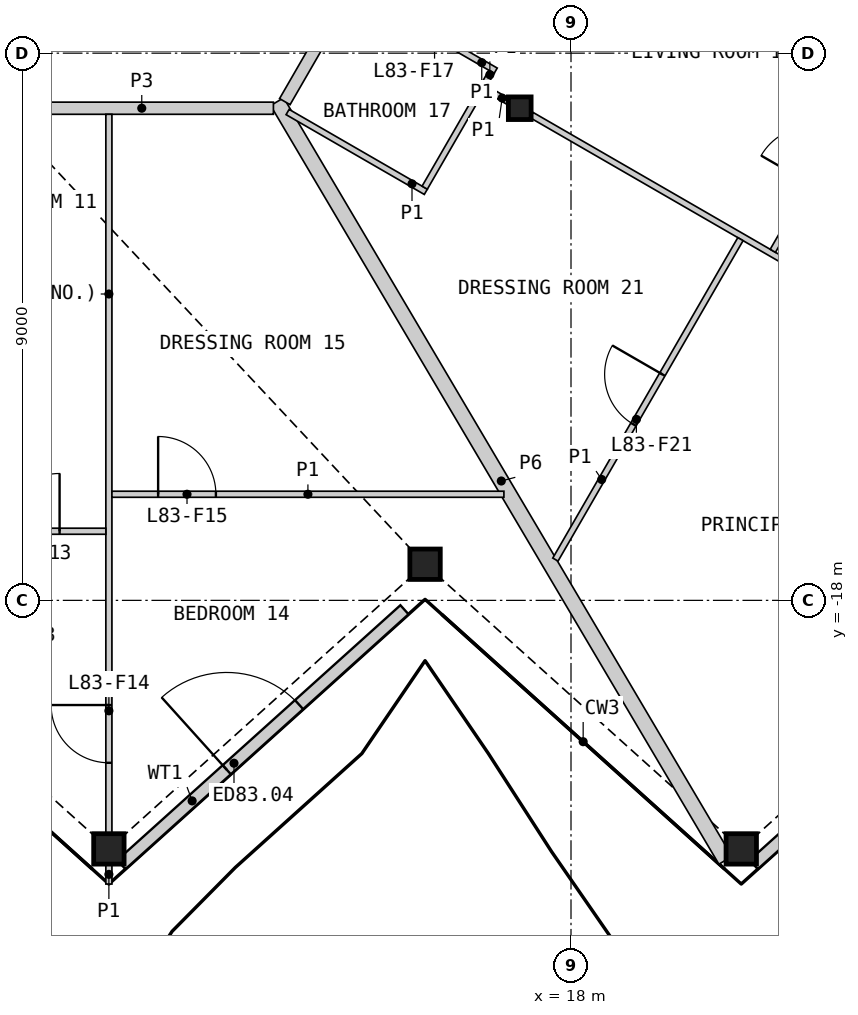
"""IFC4 building model, lengths in metres.
Left out: names, types, materials, properties, quantities, classifications, styles, units other than length and angle.
Written with IfcOpenShell. Run it as: python <this file> out.ifc"""

import sys

from ifc_helpers import new_model, si_unit, direction, frame, frame_2d, origin, origin_2d, place, context, subcontext, project, spatial, rectangle, hollow_rectangle, i_section, extrude, element, fill, save


model = new_model("IFC4")
c1 = context("Model", 3, precision=1e-05, world=origin(), true_north=direction((0.0, 1.0)))
c2 = subcontext(c1, "Body", "Model", "MODEL_VIEW")
j1 = project(units=[si_unit("LENGTHUNIT", "METRE"), si_unit("PLANEANGLEUNIT", "RADIAN")], contexts=[c1])
p1 = place(None, origin())
s1 = spatial("IfcSite", under=j1, at=p1, CompositionType="ELEMENT")
p2 = place(p1, origin())
s2 = spatial("IfcBuilding", under=s1, at=p2, CompositionType="ELEMENT")
p3 = place(p2, frame((0.0, 0.0, 371.2)))
s3 = spatial("IfcBuildingStorey", under=s2, at=p3, CompositionType="ELEMENT", Elevation=371.2)
for number, where, z_axis, x_axis in (
    (1, (10.4, -22.088, 0.0), (0.0, 0.0, 1.0), (1.0, 0.0, 0.0)),
    (2, (15.6, -17.406, 0.0), (0.0, 0.0, 1.0), (1.0, 0.0, 0.0)),
    (3, (20.8, -22.088, 0.0), (0.0, 0.0, 1.0), (1.0, 0.0, 0.0)),
):
    element("IfcColumn", number, at=place(p3, frame(where, z_axis=z_axis, x_axis=x_axis)), inside=s3, PredefinedType="COLUMN", context=c2, shape_type="SweptSolid", body=[
        extrude(hollow_rectangle(XDim=0.5, YDim=0.5, WallThickness=0.03, at=origin_2d()), origin(), (0.0, 0.0, 1.0), 3.4),
    ])
p4 = place(p3, frame((17.157, -9.906, 0.0), z_axis=(0.0, 0.0, 1.0), x_axis=(1.0, 0.0, 0.0)))
e4 = element("IfcColumn", 4, at=p4, inside=s3, PredefinedType="COLUMN", context=c2, shape_type="SweptSolid", body=[
    extrude(i_section(OverallWidth=0.374, OverallDepth=0.372, WebThickness=0.016, FlangeThickness=0.026, at=origin_2d()), origin(), (0.0, 0.0, 1.0), 3.4),
])
p5 = place(p3, frame((10.605, -22.346, 0.0), z_axis=(0.0, 0.0, 1.0), x_axis=(0.743137181878, 0.669139095339, 0.0)))
e5 = element("IfcWall", 5, at=p5, inside=s3, PredefinedType="SOLIDWALL", context=c2, shape_type="SweptSolid", body=[
    extrude(rectangle(XDim=6.265, YDim=0.2, at=frame_2d((3.133, 0.0))), origin(), (0.0, 0.0, 1.0), 2.634),
])
p6 = place(p5, frame((2.333, 0.0, 0.0)))
e6 = element("IfcOpeningElement", 6, at=p6, cuts=e5, PredefinedType="OPENING", context=c2, shape_type="SweptSolid", body=[
    extrude(rectangle(XDim=1.6, YDim=2.25, at=frame_2d((0.8, 1.125))), frame((0.0, 0.11, 0.0), z_axis=(0.0, -1.0, 0.0), x_axis=(1.0, 0.0, 0.0)), (0.0, 0.0, 1.0), 0.22),
])
p7 = place(p3, frame((21.005, -22.346, 0.0), z_axis=(0.0, 0.0, 1.0), x_axis=(0.743137181878, 0.669139095339, 0.0)))
e7 = element("IfcWall", 7, at=p7, inside=s3, PredefinedType="SOLIDWALL", context=c2, shape_type="SweptSolid", body=[
    extrude(rectangle(XDim=6.265, YDim=0.2, at=frame_2d((3.133, 0.0))), origin(), (0.0, 0.0, 1.0), 2.634),
])
p8 = place(p7, frame((2.333, 0.0, 0.0)))
e8 = element("IfcOpeningElement", 8, at=p8, cuts=e7, PredefinedType="OPENING", context=c2, shape_type="SweptSolid", body=[
    extrude(rectangle(XDim=1.6, YDim=2.25, at=frame_2d((0.8, 1.125))), frame((0.0, 0.11, 0.0), z_axis=(0.0, -1.0, 0.0), x_axis=(1.0, 0.0, 0.0)), (0.0, 0.0, 1.0), 0.22),
])
p9 = place(p3, frame((13.167, -9.798, 0.0), z_axis=(0.0, 0.0, 1.0), x_axis=(0.508707178493, -0.860939606796, 0.0)))
e9 = element("IfcWall", 9, at=p9, inside=s3, PredefinedType="PARTITIONING", context=c2, shape_type="SweptSolid", body=[
    extrude(rectangle(XDim=14.493, YDim=0.25, at=frame_2d((7.247, 0.0))), origin(), (0.0, 0.0, 1.0), 2.33),
])
p10 = place(p3, frame((8.775, -9.906, 0.0), z_axis=(0.0, 0.0, 1.0), x_axis=(1.0, 0.0, 0.0)))
e10 = element("IfcWall", 10, at=p10, inside=s3, PredefinedType="PARTITIONING", context=c2, shape_type="SweptSolid", body=[
    extrude(rectangle(XDim=4.331, YDim=0.2, at=frame_2d((2.165, 0.0))), origin(), (0.0, 0.0, 1.0), 3.1),
])
p11 = place(p3, frame((13.293, -9.797, 0.0), z_axis=(0.0, 0.0, 1.0), x_axis=(0.499967746641, 0.866044024469, 0.0)))
e11 = element("IfcWall", 11, at=p11, inside=s3, PredefinedType="PARTITIONING", context=c2, shape_type="SweptSolid", body=[
    extrude(rectangle(XDim=3.676, YDim=0.2, at=frame_2d((1.838, 0.0))), origin(), (0.0, 0.0, 1.0), 3.1),
])
p12 = place(p11, frame((2.426, 0.0, 0.0)))
e12 = element("IfcOpeningElement", 12, at=p12, cuts=e11, PredefinedType="OPENING", context=c2, shape_type="SweptSolid", body=[
    extrude(rectangle(XDim=1.0, YDim=2.1, at=frame_2d((0.5, 1.05))), frame((0.0, 0.11, 0.0), z_axis=(0.0, -1.0, 0.0), x_axis=(1.0, 0.0, 0.0)), (0.0, 0.0, 1.0), 0.22),
])
p13 = place(p3, frame((10.4, -21.828, 0.0), z_axis=(0.0, 0.0, 1.0), x_axis=(0.0, 1.0, 0.0)))
e13 = element("IfcWall", 13, at=p13, inside=s3, PredefinedType="PARTITIONING", context=c2, shape_type="SweptSolid", body=[
    extrude(rectangle(XDim=11.822, YDim=0.1, at=frame_2d((5.911, 0.0))), origin(), (0.0, 0.0, 1.0), 2.33),
])
p14 = place(p13, frame((1.156, 0.0, 0.0)))
e14 = element("IfcOpeningElement", 14, at=p14, cuts=e13, PredefinedType="OPENING", context=c2, shape_type="SweptSolid", body=[
    extrude(rectangle(XDim=0.95, YDim=2.1, at=frame_2d((0.475, 1.05))), frame((0.0, 0.06, 0.0), z_axis=(0.0, -1.0, 0.0), x_axis=(1.0, 0.0, 0.0)), (0.0, 0.0, 1.0), 0.12),
])
p15 = place(p3, frame((17.354, -10.019, 0.0), z_axis=(0.0, 0.0, 1.0), x_axis=(0.866019680922, -0.500009912158, 0.0)))
e15 = element("IfcWall", 15, at=p15, inside=s3, PredefinedType="PARTITIONING", context=c2, shape_type="SweptSolid", body=[
    extrude(rectangle(XDim=10.881, YDim=0.1, at=frame_2d((5.44, 0.0))), origin(), (0.0, 0.0, 1.0), 2.33),
])
p16 = place(p15, frame((8.276, 0.0, 0.0)))
e16 = element("IfcOpeningElement", 16, at=p16, cuts=e15, PredefinedType="OPENING", context=c2, shape_type="SweptSolid", body=[
    extrude(rectangle(XDim=0.95, YDim=2.1, at=frame_2d((0.475, 1.05))), frame((0.0, 0.06, 0.0), z_axis=(0.0, -1.0, 0.0), x_axis=(1.0, 0.0, 0.0)), (0.0, 0.0, 1.0), 0.12),
])
p17 = place(p3, frame((21.319, -12.251, 0.0), z_axis=(0.0, 0.0, 1.0), x_axis=(0.499999833739, 0.866025499775, 0.0)))
e17 = element("IfcWall", 17, at=p17, inside=s3, PredefinedType="PARTITIONING", context=c2, shape_type="SweptSolid", body=[
    extrude(rectangle(XDim=6.4, YDim=0.1, at=frame_2d((3.2, 0.0))), origin(), (0.0, 0.0, 1.0), 2.33),
])
p18 = place(p17, frame((1.26, 0.0, 0.0)))
e18 = element("IfcOpeningElement", 18, at=p18, cuts=e17, PredefinedType="OPENING", context=c2, shape_type="SweptSolid", body=[
    extrude(rectangle(XDim=0.95, YDim=2.1, at=frame_2d((0.475, 1.05))), frame((0.0, 0.06, 0.0), z_axis=(0.0, -1.0, 0.0), x_axis=(1.0, 0.0, 0.0)), (0.0, 0.0, 1.0), 0.12),
])
p19 = place(p3, frame((10.45, -16.255, 0.0), z_axis=(0.0, 0.0, 1.0), x_axis=(1.0, 0.0, 0.0)))
e19 = element("IfcWall", 19, at=p19, inside=s3, PredefinedType="PARTITIONING", context=c2, shape_type="SweptSolid", body=[
    extrude(rectangle(XDim=6.447, YDim=0.1, at=frame_2d((3.223, 0.0))), origin(), (0.0, 0.0, 1.0), 2.33),
])
p20 = place(p19, frame((0.76, 0.0, 0.0)))
e20 = element("IfcOpeningElement", 20, at=p20, cuts=e19, PredefinedType="OPENING", context=c2, shape_type="SweptSolid", body=[
    extrude(rectangle(XDim=0.95, YDim=2.1, at=frame_2d((0.475, 1.05))), frame((0.0, 0.06, 0.0), z_axis=(0.0, -1.0, 0.0), x_axis=(1.0, 0.0, 0.0)), (0.0, 0.0, 1.0), 0.12),
])
p21 = place(p3, frame((17.744, -17.329, 0.0), z_axis=(0.0, 0.0, 1.0), x_axis=(0.49997479812, 0.866039953608, 0.0)))
e21 = element("IfcWall", 21, at=p21, inside=s3, PredefinedType="PARTITIONING", context=c2, shape_type="SweptSolid", body=[
    extrude(rectangle(XDim=6.086, YDim=0.1, at=frame_2d((3.043, 0.0))), origin(), (0.0, 0.0, 1.0), 2.33),
])
p22 = place(p21, frame((2.568, 0.0, 0.0)))
e22 = element("IfcOpeningElement", 22, at=p22, cuts=e21, PredefinedType="OPENING", context=c2, shape_type="SweptSolid", body=[
    extrude(rectangle(XDim=0.95, YDim=2.1, at=frame_2d((0.475, 1.05))), frame((0.0, 0.06, 0.0), z_axis=(0.0, -1.0, 0.0), x_axis=(1.0, 0.0, 0.0)), (0.0, 0.0, 1.0), 0.12),
])
p23 = place(p3, frame((5.325, -16.863, 0.0), z_axis=(0.0, 0.0, 1.0), x_axis=(1.0, 0.0, 0.0)))
e23 = element("IfcWall", 23, at=p23, inside=s3, PredefinedType="PARTITIONING", context=c2, shape_type="SweptSolid", body=[
    extrude(rectangle(XDim=5.025, YDim=0.1, at=frame_2d((2.513, 0.0))), origin(), (0.0, 0.0, 1.0), 2.33),
])
p24 = place(p23, frame((3.314, 0.0, 0.0)))
e24 = element("IfcOpeningElement", 24, at=p24, cuts=e23, PredefinedType="OPENING", context=c2, shape_type="SweptSolid", body=[
    extrude(rectangle(XDim=0.95, YDim=2.1, at=frame_2d((0.475, 1.05))), frame((0.0, 0.06, 0.0), z_axis=(0.0, -1.0, 0.0), x_axis=(1.0, 0.0, 0.0)), (0.0, 0.0, 1.0), 0.12),
])
p25 = place(p3, frame((13.339, -9.968, 0.0), z_axis=(0.0, 0.0, 1.0), x_axis=(0.866013657776, -0.500020344131, 0.0)))
e25 = element("IfcWall", 25, at=p25, inside=s3, PredefinedType="PARTITIONING", context=c2, shape_type="SweptSolid", body=[
    extrude(rectangle(XDim=2.625, YDim=0.1, at=frame_2d((1.312, 0.0))), origin(), (0.0, 0.0, 1.0), 2.33),
])
p26 = place(p3, frame((14.467, -7.964, 0.0), z_axis=(0.0, 0.0, 1.0), x_axis=(0.866062824362, -0.499935180056, 0.0)))
e26 = element("IfcWall", 26, at=p26, inside=s3, PredefinedType="PARTITIONING", context=c2, shape_type="SweptSolid", body=[
    extrude(rectangle(XDim=2.649, YDim=0.1, at=frame_2d((1.325, 0.0))), origin(), (0.0, 0.0, 1.0), 2.33),
])
p27 = place(p26, frame((1.013, 0.0, 0.0)))
e27 = element("IfcOpeningElement", 27, at=p27, cuts=e26, PredefinedType="OPENING", context=c2, shape_type="SweptSolid", body=[
    extrude(rectangle(XDim=0.95, YDim=2.1, at=frame_2d((0.475, 1.05))), frame((0.0, 0.06, 0.0), z_axis=(0.0, -1.0, 0.0), x_axis=(1.0, 0.0, 0.0)), (0.0, 0.0, 1.0), 0.12),
])
p28 = place(p3, frame((15.594, -11.212, 0.0), z_axis=(0.0, 0.0, 1.0), x_axis=(0.499958068602, 0.866049611535, 0.0)))
e28 = element("IfcWall", 28, at=p28, inside=s3, PredefinedType="PARTITIONING", context=c2, shape_type="SweptSolid", body=[
    extrude(rectangle(XDim=1.973, YDim=0.1, at=frame_2d((0.987, 0.0))), origin(), (0.0, 0.0, 1.0), 2.33),
])
p29 = place(p3, frame((16.594, -9.581, 0.0), z_axis=(0.0, 0.0, 1.0), x_axis=(0.866137484628, -0.499805820016, 0.0)))
e29 = element("IfcWall", 29, at=p29, inside=s3, PredefinedType="PARTITIONING", context=c2, shape_type="SweptSolid", body=[
    extrude(rectangle(XDim=0.423, YDim=0.1, at=frame_2d((0.211, 0.0))), origin(), (0.0, 0.0, 1.0), 2.33),
])
p30 = place(p3, frame((10.4, -22.666, 0.0), z_axis=(0.0, 0.0, 1.0), x_axis=(0.0, 1.0, 0.0)))
e30 = element("IfcWall", 30, at=p30, inside=s3, PredefinedType="PARTITIONING", context=c2, shape_type="SweptSolid", body=[
    extrude(rectangle(XDim=0.318, YDim=0.1, at=frame_2d((0.159, 0.0))), origin(), (0.0, 0.0, 1.0), 2.33),
])
p31 = place(p3, frame((16.582, -9.501, 0.0), z_axis=(0.0, 0.0, 1.0), x_axis=(0.49742780181, 0.86750537865, 0.0)))
e31 = element("IfcWall", 31, at=p31, inside=s3, PredefinedType="PARTITIONING", context=c2, shape_type="SweptSolid", body=[
    extrude(rectangle(XDim=0.224, YDim=0.1, at=frame_2d((0.112, 0.0))), origin(), (0.0, 0.0, 1.0), 2.33),
])
p32 = place(p6, origin())
e32 = element("IfcDoor", 32, at=p32, inside=s3, OperationType="DOUBLE_DOOR_SINGLE_SWING", PredefinedType="DOOR", context=c2, shape_type="SweptSolid", body=[
    extrude(rectangle(XDim=1.6, YDim=2.25, at=frame_2d((0.8, 1.125))), frame((0.0, 0.025, 0.0), z_axis=(0.0, -1.0, 0.0), x_axis=(1.0, 0.0, 0.0)), (0.0, 0.0, 1.0), 0.05),
])
fill(e6, e32)
p33 = place(p24, origin())
e33 = element("IfcDoor", 33, at=p33, inside=s3, OperationType="SINGLE_SWING_RIGHT", PredefinedType="DOOR", context=c2, shape_type="SweptSolid", body=[
    extrude(rectangle(XDim=0.95, YDim=2.1, at=frame_2d((0.475, 1.05))), frame((0.0, 0.025, 0.0), z_axis=(0.0, -1.0, 0.0), x_axis=(1.0, 0.0, 0.0)), (0.0, 0.0, 1.0), 0.05),
])
fill(e24, e33)
p34 = place(p14, origin())
e34 = element("IfcDoor", 34, at=p34, inside=s3, OperationType="SINGLE_SWING_RIGHT", PredefinedType="DOOR", context=c2, shape_type="SweptSolid", body=[
    extrude(rectangle(XDim=0.95, YDim=2.1, at=frame_2d((0.475, 1.05))), frame((0.0, 0.025, 0.0), z_axis=(0.0, -1.0, 0.0), x_axis=(1.0, 0.0, 0.0)), (0.0, 0.0, 1.0), 0.05),
])
fill(e14, e34)
p35 = place(p20, origin())
e35 = element("IfcDoor", 35, at=p35, inside=s3, OperationType="SINGLE_SWING_LEFT", PredefinedType="DOOR", context=c2, shape_type="SweptSolid", body=[
    extrude(rectangle(XDim=0.95, YDim=2.1, at=frame_2d((0.475, 1.05))), frame((0.0, 0.025, 0.0), z_axis=(0.0, -1.0, 0.0), x_axis=(1.0, 0.0, 0.0)), (0.0, 0.0, 1.0), 0.05),
])
fill(e20, e35)
p36 = place(p22, origin())
e36 = element("IfcDoor", 36, at=p36, inside=s3, OperationType="SINGLE_SWING_RIGHT", PredefinedType="DOOR", context=c2, shape_type="SweptSolid", body=[
    extrude(rectangle(XDim=0.95, YDim=2.1, at=frame_2d((0.475, 1.05))), frame((0.0, 0.025, 0.0), z_axis=(0.0, -1.0, 0.0), x_axis=(1.0, 0.0, 0.0)), (0.0, 0.0, 1.0), 0.05),
])
fill(e22, e36)
save(model, sys.argv[1])
